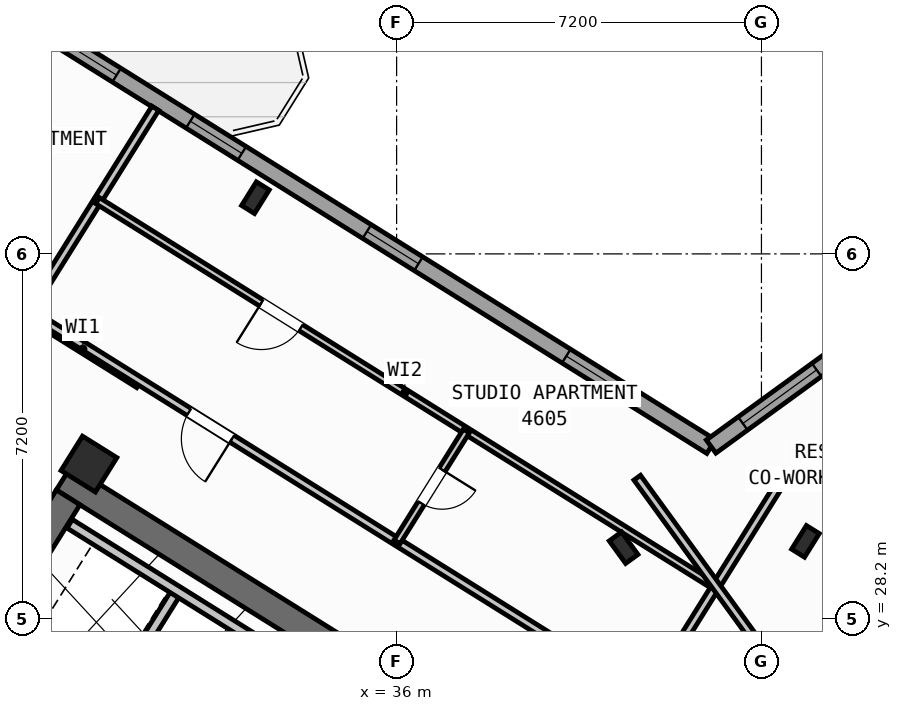
"""IFC4 building model, lengths in metres.
Left out: names, types, materials, properties, quantities, classifications, styles, units other than length and angle.
Written with IfcOpenShell. Run it as: python <this file> out.ifc"""

import sys

from ifc_helpers import new_model, si_unit, direction, frame, frame_2d, origin, origin_2d, place, context, subcontext, project, spatial, rectangle, hollow_rectangle, i_section, extrude, source, transform, mapped, element, fill, save


model = new_model("IFC4")
c1 = context("Model", 3, precision=1e-05, world=origin(), true_north=direction((0.0, 1.0)))
c2 = subcontext(c1, "Body", "Model", "MODEL_VIEW")
j1 = project(units=[si_unit("LENGTHUNIT", "METRE"), si_unit("PLANEANGLEUNIT", "RADIAN")], contexts=[c1])
p1 = place(None, origin())
s1 = spatial("IfcSite", under=j1, at=p1, CompositionType="ELEMENT")
p2 = place(p1, origin())
s2 = spatial("IfcBuilding", under=s1, at=p2, CompositionType="ELEMENT")
p3 = place(p2, frame((0.0, 0.0, 184.2)))
s3 = spatial("IfcBuildingStorey", under=s2, at=p3, CompositionType="ELEMENT", Elevation=184.2)
p4 = place(p3, frame((40.573, 24.01, 0.0), z_axis=(0.0, 0.0, 1.0), x_axis=(-0.848047359947, 0.529920442413, 0.0)))
e1 = element("IfcWall", 1, at=p4, inside=s3, PredefinedType="SHEAR", context=c2, shape_type="SweptSolid", body=[
    extrude(rectangle(XDim=13.14, YDim=0.55, at=frame_2d((6.57, 0.0))), origin(), (0.0, 0.0, 1.0), 3.35),
])
p5 = place(p3, frame((29.517, 30.594, 0.0), z_axis=(0.0, 0.0, 1.0), x_axis=(-0.529906864564, -0.848055844204, 0.0)))
e2 = element("IfcWall", 2, at=p5, inside=s3, PredefinedType="SHEAR", context=c2, shape_type="SweptSolid", body=[
    extrude(rectangle(XDim=3.575, YDim=0.55, at=frame_2d((1.788, 0.0))), origin(), (0.0, 0.0, 1.0), 3.35),
])
p6 = place(p3, frame((44.365, 24.142, 0.0), z_axis=(0.0, 0.0, 1.0), x_axis=(0.809024304885, 0.587775190107, 0.0)))
e3 = element("IfcWall", 3, at=p6, inside=s3, PredefinedType="SHEAR", context=c2, shape_type="SweptSolid", body=[
    extrude(rectangle(XDim=12.34, YDim=0.55, at=frame_2d((6.17, 0.0))), origin(), (0.0, 0.0, 1.0), 3.35),
])
m1 = source(origin(), c2, "Body", "SweptSolid", [
    extrude(i_section(OverallWidth=0.3, OverallDepth=0.55, WebThickness=0.015, FlangeThickness=0.029, at=origin_2d()), origin(), (0.0, 0.0, 1.0), 3.6),
])
for number, where, z_axis, x_axis in (
    (4, (44.068, 29.726, 0.0), (0.0, 0.0, 1.0), (-0.848, 0.53, 0.0)),
    (5, (33.213, 36.509, 0.0), (0.0, 0.0, 1.0), (-0.848, 0.53, 0.0)),
):
    element("IfcColumn", number, at=place(p3, frame(where, z_axis=z_axis, x_axis=x_axis)), inside=s3, PredefinedType="COLUMN", context=c2, shape_type="MappedRepresentation", body=[
        mapped(m1, transform((0.0, 0.0, 0.0), scale=1.0)),
    ])
m2 = source(origin(), c2, "Body", "SweptSolid", [
    extrude(hollow_rectangle(XDim=0.8, YDim=0.8, WallThickness=0.032, at=origin_2d()), origin(), (0.0, 0.0, 1.0), 3.6),
])
p7 = place(p3, frame((29.928, 31.251, 0.0), z_axis=(0.0, 0.0, 1.0), x_axis=(-0.848048096156, 0.529919264233, 0.0)))
e6 = element("IfcColumn", 6, at=p7, inside=s3, PredefinedType="COLUMN", context=c2, shape_type="MappedRepresentation", body=[
    mapped(m2, transform((0.0, 0.0, 0.0), scale=1.0)),
])
p8 = place(p3, frame((40.479, 29.601, 0.0), z_axis=(0.0, 0.0, 1.0), x_axis=(0.809016994375, 0.587785252292, 0.0)))
e7 = element("IfcColumn", 7, at=p8, inside=s3, PredefinedType="COLUMN", context=c2, shape_type="MappedRepresentation", body=[
    mapped(m1, transform((0.0, 0.0, 0.0), scale=1.0)),
])
p9 = place(p3, frame((31.76, 12.183, 0.0), z_axis=(0.0, 0.0, 1.0), x_axis=(-0.848047074256, 0.529920899612, 0.0)))
e8 = element("IfcWall", 8, at=p9, inside=s3, PredefinedType="STANDARD", context=c2, shape_type="SweptSolid", body=[
    extrude(rectangle(XDim=30.652, YDim=0.32, at=frame_2d((15.326, 0.0))), origin(), (0.0, 0.0, 1.0), 3.35),
])
p10 = place(p9, frame((15.166, 0.0, 0.0)))
e9 = element("IfcOpeningElement", 9, at=p10, cuts=e8, PredefinedType="OPENING", context=c2, shape_type="SweptSolid", body=[
    extrude(rectangle(XDim=1.2, YDim=2.15, at=frame_2d((0.6, 1.075))), frame((0.0, 0.17, 0.0), z_axis=(0.0, -1.0, 0.0), x_axis=(1.0, 0.0, 0.0)), (0.0, 0.0, 1.0), 0.34),
])
p11 = place(p9, frame((2.015, 0.0, 0.8)))
e10 = element("IfcOpeningElement", 10, at=p11, cuts=e8, PredefinedType="OPENING", context=c2, shape_type="SweptSolid", body=[
    extrude(rectangle(XDim=2.1, YDim=1.55, at=frame_2d((1.05, 0.775))), frame((0.0, 0.17, 0.0), z_axis=(0.0, -1.0, 0.0), x_axis=(1.0, 0.0, 0.0)), (0.0, 0.0, 1.0), 0.34),
])
p12 = place(p9, frame((7.244, 0.0, 0.8)))
e11 = element("IfcOpeningElement", 11, at=p12, cuts=e8, PredefinedType="OPENING", context=c2, shape_type="SweptSolid", body=[
    extrude(rectangle(XDim=2.1, YDim=1.55, at=frame_2d((1.05, 0.775))), frame((0.0, 0.17, 0.0), z_axis=(0.0, -1.0, 0.0), x_axis=(1.0, 0.0, 0.0)), (0.0, 0.0, 1.0), 0.34),
])
p13 = place(p9, frame((12.623, 0.0, 1.0)))
e12 = element("IfcOpeningElement", 12, at=p13, cuts=e8, PredefinedType="OPENING", context=c2, shape_type="SweptSolid", body=[
    extrude(rectangle(XDim=0.9, YDim=1.25, at=frame_2d((0.45, 0.625))), frame((0.0, 0.17, 0.0), z_axis=(0.0, -1.0, 0.0), x_axis=(1.0, 0.0, 0.0)), (0.0, 0.0, 1.0), 0.34),
])
p14 = place(p9, frame((19.565, 0.0, 0.95)))
e13 = element("IfcOpeningElement", 13, at=p14, cuts=e8, PredefinedType="OPENING", context=c2, shape_type="SweptSolid", body=[
    extrude(rectangle(XDim=1.2, YDim=1.4, at=frame_2d((0.6, 0.7))), frame((0.0, 0.17, 0.0), z_axis=(0.0, -1.0, 0.0), x_axis=(1.0, 0.0, 0.0)), (0.0, 0.0, 1.0), 0.34),
])
p15 = place(p9, frame((25.983, 0.0, 1.0)))
e14 = element("IfcOpeningElement", 14, at=p15, cuts=e8, PredefinedType="OPENING", context=c2, shape_type="SweptSolid", body=[
    extrude(rectangle(XDim=0.9, YDim=1.25, at=frame_2d((0.45, 0.625))), frame((0.0, 0.17, 0.0), z_axis=(0.0, -1.0, 0.0), x_axis=(1.0, 0.0, 0.0)), (0.0, 0.0, 1.0), 0.34),
])
p16 = place(p9, frame((28.433, 0.0, 1.0)))
e15 = element("IfcOpeningElement", 15, at=p16, cuts=e8, PredefinedType="OPENING", context=c2, shape_type="SweptSolid", body=[
    extrude(rectangle(XDim=0.9, YDim=1.25, at=frame_2d((0.45, 0.625))), frame((0.0, 0.17, 0.0), z_axis=(0.0, -1.0, 0.0), x_axis=(1.0, 0.0, 0.0)), (0.0, 0.0, 1.0), 0.34),
])
p17 = place(p3, frame((17.424, 47.083, 0.0), z_axis=(0.0, 0.0, 1.0), x_axis=(0.848049927979, -0.529916332693, 0.0)))
e16 = element("IfcWall", 16, at=p17, inside=s3, PredefinedType="STANDARD", context=c2, shape_type="SweptSolid", body=[
    extrude(rectangle(XDim=29.223, YDim=0.32, at=frame_2d((14.612, 0.0))), origin(), (0.0, 0.0, 1.0), 3.35),
])
p18 = place(p17, frame((3.764, 0.0, 0.0)))
e17 = element("IfcOpeningElement", 17, at=p18, cuts=e16, PredefinedType="OPENING", context=c2, shape_type="SweptSolid", body=[
    extrude(rectangle(XDim=1.05, YDim=2.15, at=frame_2d((0.525, 1.075))), frame((0.0, 0.17, 0.0), z_axis=(0.0, -1.0, 0.0), x_axis=(1.0, 0.0, 0.0)), (0.0, 0.0, 1.0), 0.34),
])
p19 = place(p17, frame((8.344, 0.0, 0.8)))
e18 = element("IfcOpeningElement", 18, at=p19, cuts=e16, PredefinedType="OPENING", context=c2, shape_type="SweptSolid", body=[
    extrude(rectangle(XDim=2.1, YDim=1.55, at=frame_2d((1.05, 0.775))), frame((0.0, 0.17, 0.0), z_axis=(0.0, -1.0, 0.0), x_axis=(1.0, 0.0, 0.0)), (0.0, 0.0, 1.0), 0.34),
])
p20 = place(p17, frame((13.589, 0.0, 0.85)))
e19 = element("IfcOpeningElement", 19, at=p20, cuts=e16, PredefinedType="OPENING", context=c2, shape_type="SweptSolid", body=[
    extrude(rectangle(XDim=1.8, YDim=1.5, at=frame_2d((0.9, 0.75))), frame((0.0, 0.17, 0.0), z_axis=(0.0, -1.0, 0.0), x_axis=(1.0, 0.0, 0.0)), (0.0, 0.0, 1.0), 0.34),
])
p21 = place(p17, frame((17.104, 0.0, 0.95)))
e20 = element("IfcOpeningElement", 20, at=p21, cuts=e16, PredefinedType="OPENING", context=c2, shape_type="SweptSolid", body=[
    extrude(rectangle(XDim=1.2, YDim=1.4, at=frame_2d((0.6, 0.7))), frame((0.0, 0.17, 0.0), z_axis=(0.0, -1.0, 0.0), x_axis=(1.0, 0.0, 0.0)), (0.0, 0.0, 1.0), 0.34),
])
p22 = place(p17, frame((21.214, 0.0, 0.95)))
e21 = element("IfcOpeningElement", 21, at=p22, cuts=e16, PredefinedType="OPENING", context=c2, shape_type="SweptSolid", body=[
    extrude(rectangle(XDim=1.2, YDim=1.4, at=frame_2d((0.6, 0.7))), frame((0.0, 0.17, 0.0), z_axis=(0.0, -1.0, 0.0), x_axis=(1.0, 0.0, 0.0)), (0.0, 0.0, 1.0), 0.34),
])
p23 = place(p17, frame((25.853, 0.0, 0.95)))
e22 = element("IfcOpeningElement", 22, at=p23, cuts=e16, PredefinedType="OPENING", context=c2, shape_type="SweptSolid", body=[
    extrude(rectangle(XDim=1.2, YDim=1.4, at=frame_2d((0.6, 0.7))), frame((0.0, 0.17, 0.0), z_axis=(0.0, -1.0, 0.0), x_axis=(1.0, 0.0, 0.0)), (0.0, 0.0, 1.0), 0.34),
])
p24 = place(p3, frame((42.207, 31.597, 0.0), z_axis=(0.0, 0.0, 1.0), x_axis=(0.809020333377, 0.587780656523, 0.0)))
e23 = element("IfcWall", 23, at=p24, inside=s3, PredefinedType="STANDARD", context=c2, shape_type="SweptSolid", body=[
    extrude(rectangle(XDim=15.223, YDim=0.32, at=frame_2d((7.611, 0.0))), origin(), (0.0, 0.0, 1.0), 3.35),
])
p25 = place(p24, frame((12.82, 0.0, 0.0)))
e24 = element("IfcOpeningElement", 24, at=p25, cuts=e23, PredefinedType="OPENING", context=c2, shape_type="SweptSolid", body=[
    extrude(rectangle(XDim=1.05, YDim=2.15, at=frame_2d((0.525, 1.075))), frame((0.0, 0.17, 0.0), z_axis=(0.0, -1.0, 0.0), x_axis=(1.0, 0.0, 0.0)), (0.0, 0.0, 1.0), 0.34),
])
p26 = place(p24, frame((0.775, 0.0, 0.85)))
e25 = element("IfcOpeningElement", 25, at=p26, cuts=e23, PredefinedType="OPENING", context=c2, shape_type="SweptSolid", body=[
    extrude(rectangle(XDim=1.8, YDim=1.5, at=frame_2d((0.9, 0.75))), frame((0.0, 0.17, 0.0), z_axis=(0.0, -1.0, 0.0), x_axis=(1.0, 0.0, 0.0)), (0.0, 0.0, 1.0), 0.34),
])
p27 = place(p24, frame((5.544, 0.0, 0.85)))
e26 = element("IfcOpeningElement", 26, at=p27, cuts=e23, PredefinedType="OPENING", context=c2, shape_type="SweptSolid", body=[
    extrude(rectangle(XDim=1.8, YDim=1.5, at=frame_2d((0.9, 0.75))), frame((0.0, 0.17, 0.0), z_axis=(0.0, -1.0, 0.0), x_axis=(1.0, 0.0, 0.0)), (0.0, 0.0, 1.0), 0.34),
])
p28 = place(p24, frame((10.219, 0.0, 1.0)))
e27 = element("IfcOpeningElement", 27, at=p28, cuts=e23, PredefinedType="OPENING", context=c2, shape_type="SweptSolid", body=[
    extrude(rectangle(XDim=0.9, YDim=1.25, at=frame_2d((0.45, 0.625))), frame((0.0, 0.17, 0.0), z_axis=(0.0, -1.0, 0.0), x_axis=(1.0, 0.0, 0.0)), (0.0, 0.0, 1.0), 0.34),
])
p29 = place(p3, frame((31.645, 28.716, 0.0), z_axis=(0.0, 0.0, 1.0), x_axis=(-0.52986693015, -0.848080795876, 0.0)))
e28 = element("IfcWall", 28, at=p29, inside=s3, PredefinedType="STANDARD", context=c2, shape_type="SweptSolid", body=[
    extrude(rectangle(XDim=2.66, YDim=0.2, at=frame_2d((1.33, 0.0))), origin(), (0.0, 0.0, 1.0), 3.34),
])
p30 = place(p3, frame((33.363, 27.69, 0.0), z_axis=(0.0, 0.0, 1.0), x_axis=(-0.848047090064, 0.529920874315, 0.0)))
e29 = element("IfcWall", 29, at=p30, inside=s3, PredefinedType="STANDARD", context=c2, shape_type="SweptSolid", body=[
    extrude(rectangle(XDim=4.498, YDim=0.2, at=frame_2d((2.249, 0.0))), origin(), (0.0, 0.0, 1.0), 3.34),
])
p31 = place(p3, frame((30.914, 32.829, 0.0), z_axis=(0.0, 0.0, 1.0), x_axis=(-0.848008813643, 0.529982124211, 0.0)))
e30 = element("IfcWall", 30, at=p31, inside=s3, PredefinedType="PARTITIONING", context=c2, shape_type="SweptSolid", body=[
    extrude(rectangle(XDim=2.61, YDim=0.16, at=frame_2d((1.305, 0.0))), origin(), (0.0, 0.0, 1.0), 3.34),
])
p32 = place(p3, frame((31.239, 38.274, 0.0), z_axis=(0.0, 0.0, 1.0), x_axis=(-0.529914125013, -0.848051307476, 0.0)))
e31 = element("IfcWall", 31, at=p32, inside=s3, PredefinedType="PARTITIONING", context=c2, shape_type="SweptSolid", body=[
    extrude(rectangle(XDim=10.35, YDim=0.16, at=frame_2d((5.175, 0.0))), origin(), (0.0, 0.0, 1.0), 3.34),
])
p33 = place(p3, frame((41.936, 26.012, 0.0), z_axis=(0.0, 0.0, 1.0), x_axis=(-0.848051154596, 0.529914369676, 0.0)))
e32 = element("IfcWall", 32, at=p33, inside=s3, PredefinedType="PARTITIONING", context=c2, shape_type="SweptSolid", body=[
    extrude(rectangle(XDim=15.57, YDim=0.16, at=frame_2d((7.785, 0.0))), origin(), (0.0, 0.0, 1.0), 3.34),
])
p34 = place(p33, frame((10.83, 0.0, 0.0)))
e33 = element("IfcOpeningElement", 33, at=p34, cuts=e32, PredefinedType="OPENING", context=c2, shape_type="SweptSolid", body=[
    extrude(rectangle(XDim=1.0, YDim=2.1, at=frame_2d((0.5, 1.05))), frame((0.0, 0.09, 0.0), z_axis=(0.0, -1.0, 0.0), x_axis=(1.0, 0.0, 0.0)), (0.0, 0.0, 1.0), 0.18),
])
p35 = place(p3, frame((43.704, 31.086, 0.0), z_axis=(0.0, 0.0, 1.0), x_axis=(-0.529906828443, -0.848055866774, 0.0)))
e34 = element("IfcWall", 34, at=p35, inside=s3, PredefinedType="PARTITIONING", context=c2, shape_type="SweptSolid", body=[
    extrude(rectangle(XDim=5.48, YDim=0.16, at=frame_2d((2.74, 0.0))), origin(), (0.0, 0.0, 1.0), 3.34),
])
p36 = place(p3, frame((42.226, 28.873, 0.0), z_axis=(0.0, 0.0, 1.0), x_axis=(-0.848049134363, 0.529917602752, 0.0)))
e35 = element("IfcWall", 35, at=p36, inside=s3, PredefinedType="PLUMBINGWALL", context=c2, shape_type="SweptSolid", body=[
    extrude(rectangle(XDim=14.3, YDim=0.14, at=frame_2d((7.15, 0.0))), origin(), (0.0, 0.0, 1.0), 3.34),
])
p37 = place(p36, frame((9.57, 0.0, 0.0)))
e36 = element("IfcOpeningElement", 36, at=p37, cuts=e35, PredefinedType="OPENING", context=c2, shape_type="SweptSolid", body=[
    extrude(rectangle(XDim=0.92, YDim=2.08, at=frame_2d((0.46, 1.04))), frame((0.0, 0.08, 0.0), z_axis=(0.0, -1.0, 0.0), x_axis=(1.0, 0.0, 0.0)), (0.0, 0.0, 1.0), 0.16),
])
p38 = place(p3, frame((37.375, 31.904, 0.0), z_axis=(0.0, 0.0, 1.0), x_axis=(-0.529913878929, -0.848051461244, 0.0)))
e37 = element("IfcWall", 37, at=p38, inside=s3, PredefinedType="PLUMBINGWALL", context=c2, shape_type="SweptSolid", body=[
    extrude(rectangle(XDim=2.58, YDim=0.14, at=frame_2d((1.29, 0.0))), origin(), (0.0, 0.0, 1.0), 3.34),
])
p39 = place(p38, frame((0.9, 0.0, 0.0)))
e38 = element("IfcOpeningElement", 38, at=p39, cuts=e37, PredefinedType="OPENING", context=c2, shape_type="SweptSolid", body=[
    extrude(rectangle(XDim=0.78, YDim=2.05, at=frame_2d((0.39, 1.025))), frame((0.0, 0.08, 0.0), z_axis=(0.0, -1.0, 0.0), x_axis=(1.0, 0.0, 0.0)), (0.0, 0.0, 1.0), 0.16),
])
p40 = place(p3, frame((42.866, 26.044, 0.0), z_axis=(0.0, 0.0, 1.0), x_axis=(0.809020254154, 0.587780765566, 0.0)))
e39 = element("IfcWall", 39, at=p40, inside=s3, PredefinedType="PARTITIONING", context=c2, shape_type="SweptSolid", body=[
    extrude(rectangle(XDim=14.67, YDim=0.16, at=frame_2d((7.335, 0.0))), origin(), (0.0, 0.0, 1.0), 3.34),
])
p41 = place(p40, frame((3.215, 0.0, 0.0)))
e40 = element("IfcOpeningElement", 40, at=p41, cuts=e39, PredefinedType="OPENING", context=c2, shape_type="SweptSolid", body=[
    extrude(rectangle(XDim=1.0, YDim=2.1, at=frame_2d((0.5, 1.05))), frame((0.0, 0.09, 0.0), z_axis=(0.0, -1.0, 0.0), x_axis=(1.0, 0.0, 0.0)), (0.0, 0.0, 1.0), 0.18),
])
p42 = place(p40, frame((9.915, 0.0, 0.0)))
e41 = element("IfcOpeningElement", 41, at=p42, cuts=e39, PredefinedType="OPENING", context=c2, shape_type="SweptSolid", body=[
    extrude(rectangle(XDim=1.0, YDim=2.1, at=frame_2d((0.5, 1.05))), frame((0.0, 0.09, 0.0), z_axis=(0.0, -1.0, 0.0), x_axis=(1.0, 0.0, 0.0)), (0.0, 0.0, 1.0), 0.18),
])
p43 = place(p3, frame((43.969, 26.55, 0.0), z_axis=(0.0, 0.0, 1.0), x_axis=(-0.587776919386, 0.80902304852, 0.0)))
e42 = element("IfcWall", 42, at=p43, inside=s3, PredefinedType="PARTITIONING", context=c2, shape_type="SweptSolid", body=[
    extrude(rectangle(XDim=5.48, YDim=0.16, at=frame_2d((2.74, 0.0))), origin(), (0.0, 0.0, 1.0), 3.34),
])
m3 = source(origin(), c2, "Body", "SweptSolid", [
    extrude(rectangle(XDim=1.8, YDim=1.5, at=frame_2d((0.9, 0.75))), frame((0.0, 0.03, 0.0), z_axis=(0.0, -1.0, 0.0), x_axis=(1.0, 0.0, 0.0)), (0.0, 0.0, 1.0), 0.06),
])
p44 = place(p20, origin())
e43 = element("IfcWindow", 43, at=p44, inside=s3, PartitioningType="SINGLE_PANEL", PredefinedType="WINDOW", context=c2, shape_type="MappedRepresentation", body=[
    mapped(m3, transform((0.0, 0.0, 0.0), scale=1.0)),
])
fill(e19, e43)
m4 = source(origin(), c2, "Body", "SweptSolid", [
    extrude(rectangle(XDim=1.2, YDim=1.4, at=frame_2d((0.6, 0.7))), frame((0.0, 0.03, 0.0), z_axis=(0.0, -1.0, 0.0), x_axis=(1.0, 0.0, 0.0)), (0.0, 0.0, 1.0), 0.06),
])
p45 = place(p21, origin())
e44 = element("IfcWindow", 44, at=p45, inside=s3, PartitioningType="SINGLE_PANEL", PredefinedType="WINDOW", context=c2, shape_type="MappedRepresentation", body=[
    mapped(m4, transform((0.0, 0.0, 0.0), scale=1.0)),
])
fill(e20, e44)
p46 = place(p22, origin())
e45 = element("IfcWindow", 45, at=p46, inside=s3, PartitioningType="SINGLE_PANEL", PredefinedType="WINDOW", context=c2, shape_type="MappedRepresentation", body=[
    mapped(m4, transform((0.0, 0.0, 0.0), scale=1.0)),
])
fill(e21, e45)
p47 = place(p23, origin())
e46 = element("IfcWindow", 46, at=p47, inside=s3, PartitioningType="SINGLE_PANEL", PredefinedType="WINDOW", context=c2, shape_type="MappedRepresentation", body=[
    mapped(m4, transform((0.0, 0.0, 0.0), scale=1.0)),
])
fill(e22, e46)
p48 = place(p26, origin())
e47 = element("IfcWindow", 47, at=p48, inside=s3, PartitioningType="SINGLE_PANEL", PredefinedType="WINDOW", context=c2, shape_type="MappedRepresentation", body=[
    mapped(m3, transform((0.0, 0.0, 0.0), scale=1.0)),
])
fill(e25, e47)
m5 = source(origin(), c2, "Body", "SweptSolid", [
    extrude(rectangle(XDim=1.0, YDim=2.1, at=frame_2d((0.5, 1.05))), frame((0.0, 0.025, 0.0), z_axis=(0.0, -1.0, 0.0), x_axis=(1.0, 0.0, 0.0)), (0.0, 0.0, 1.0), 0.05),
])
p49 = place(p34, origin())
e48 = element("IfcDoor", 48, at=p49, inside=s3, OperationType="SINGLE_SWING_LEFT", PredefinedType="DOOR", context=c2, shape_type="MappedRepresentation", body=[
    mapped(m5, transform((0.0, 0.0, 0.0), scale=1.0)),
])
fill(e33, e48)
m6 = source(origin(), c2, "Body", "SweptSolid", [
    extrude(rectangle(XDim=0.92, YDim=2.08, at=frame_2d((0.46, 1.04))), frame((0.0, 0.025, 0.0), z_axis=(0.0, -1.0, 0.0), x_axis=(1.0, 0.0, 0.0)), (0.0, 0.0, 1.0), 0.05),
])
p50 = place(p37, origin())
e49 = element("IfcDoor", 49, at=p50, inside=s3, OperationType="SINGLE_SWING_RIGHT", PredefinedType="DOOR", context=c2, shape_type="MappedRepresentation", body=[
    mapped(m6, transform((0.0, 0.0, 0.0), scale=1.0)),
])
fill(e36, e49)
m7 = source(origin(), c2, "Body", "SweptSolid", [
    extrude(rectangle(XDim=0.78, YDim=2.05, at=frame_2d((0.39, 1.025))), frame((0.0, 0.025, 0.0), z_axis=(0.0, -1.0, 0.0), x_axis=(1.0, 0.0, 0.0)), (0.0, 0.0, 1.0), 0.05),
])
p51 = place(p39, origin())
e50 = element("IfcDoor", 50, at=p51, inside=s3, OperationType="SINGLE_SWING_LEFT", PredefinedType="DOOR", context=c2, shape_type="MappedRepresentation", body=[
    mapped(m7, transform((0.0, 0.0, 0.0), scale=1.0)),
])
fill(e38, e50)
save(model, sys.argv[1])
